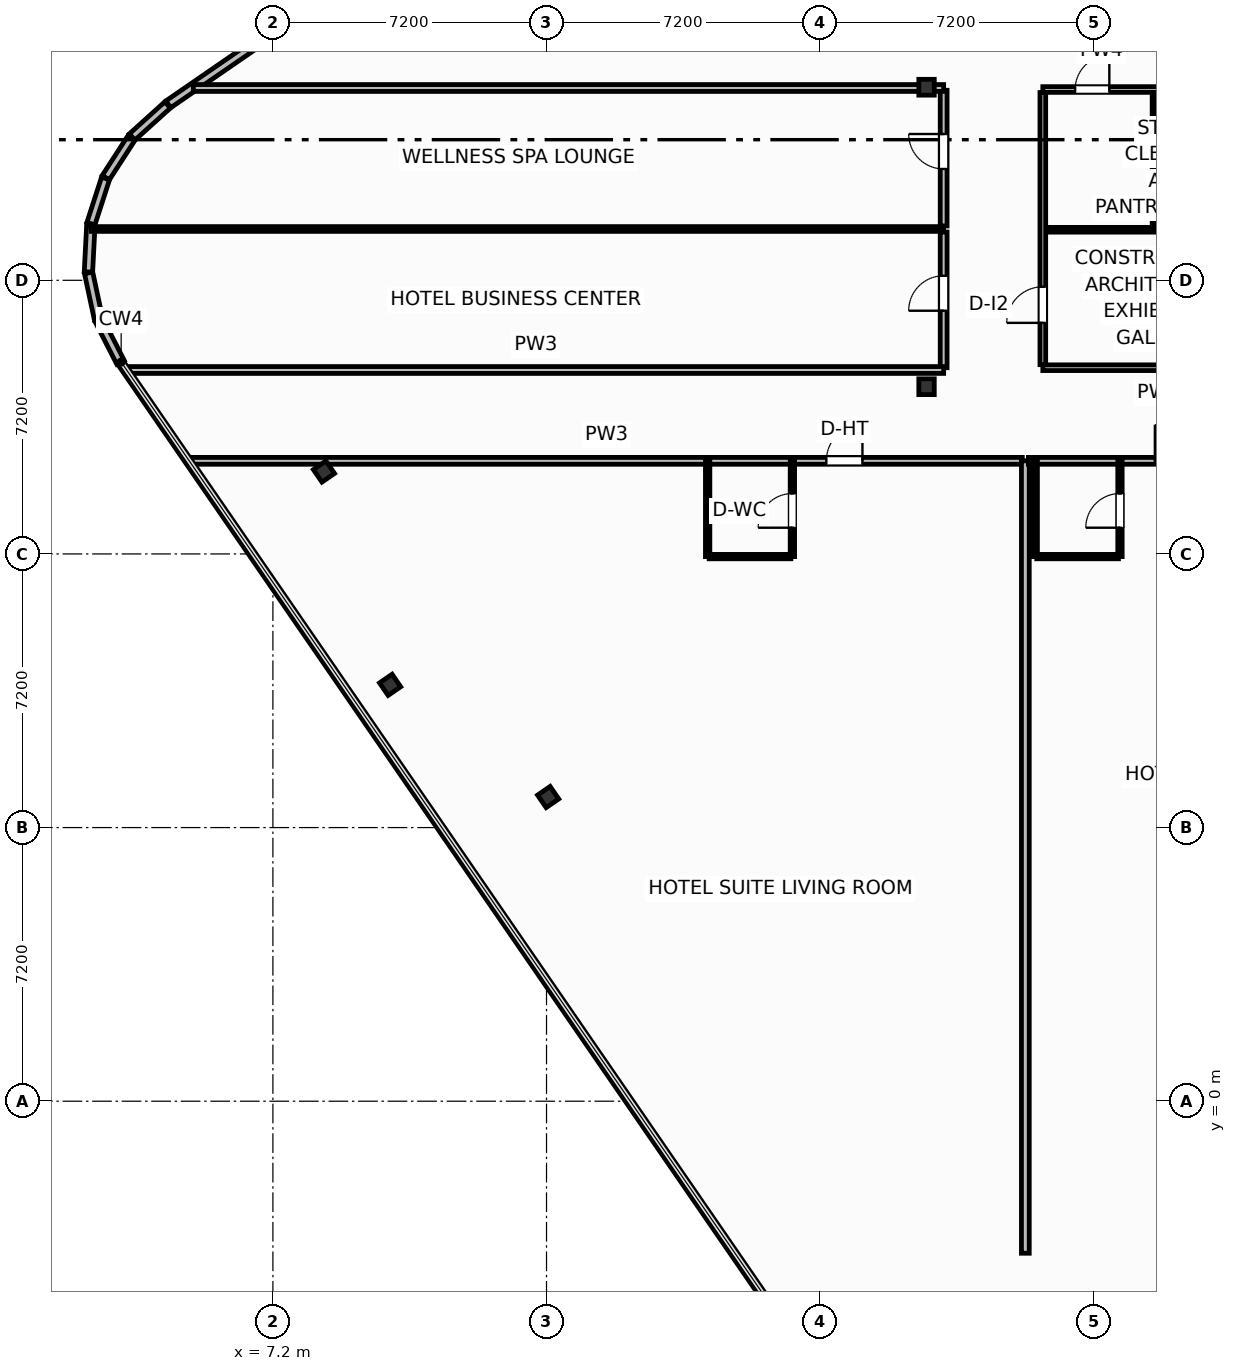
"""IFC4 building model, lengths in metres.
Left out: names, types, materials, properties, quantities, classifications, styles, units other than length and angle.
Written with IfcOpenShell. Run it as: python <this file> out.ifc"""

import sys

from ifc_helpers import new_model, si_unit, direction, frame, frame_2d, origin, origin_2d, place, context, subcontext, project, spatial, rectangle, i_section, extrude, element, fill, save


model = new_model("IFC4")
c1 = context("Model", 3, precision=1e-05, world=origin(), true_north=direction((0.0, 1.0)))
c2 = subcontext(c1, "Body", "Model", "MODEL_VIEW")
j1 = project(units=[si_unit("LENGTHUNIT", "METRE"), si_unit("PLANEANGLEUNIT", "RADIAN")], contexts=[c1])
p1 = place(None, origin())
s1 = spatial("IfcSite", under=j1, at=p1, CompositionType="ELEMENT")
p2 = place(p1, origin())
s2 = spatial("IfcBuilding", under=s1, at=p2, CompositionType="ELEMENT")
p3 = place(p2, frame((0.0, 0.0, 273.0)))
s3 = spatial("IfcBuildingStorey", under=s2, at=p3, CompositionType="ELEMENT", Elevation=273.0)
for number, where, z_axis, x_axis in (
    (1, (24.4, 18.8, 0.0), (0.0, 0.0, 1.0), (1.0, 0.0, 0.0)),
    (2, (24.4, 26.68, 0.0), (0.0, 0.0, 1.0), (1.0, 0.0, 0.0)),
):
    element("IfcColumn", number, at=place(p3, frame(where, z_axis=z_axis, x_axis=x_axis)), inside=s3, PredefinedType="COLUMN", context=c2, shape_type="SweptSolid", body=[
        extrude(i_section(OverallWidth=0.406, OverallDepth=0.416, WebThickness=0.03, FlangeThickness=0.048, FilletRadius=0.025, at=origin_2d()), origin(), (0.0, 0.0, 1.0), 3.7),
    ])
for number, where, z_axis, x_axis in (
    (3, (8.543, 16.569, 0.0), (0.0, 0.0, 1.0), (0.824, 0.567, 0.0)),
    (4, (10.284, 10.956, 0.0), (0.0, 0.0, 1.0), (0.824, 0.567, 0.0)),
    (5, (14.443, 8.004, 0.0), (0.0, 0.0, 1.0), (0.824, 0.567, 0.0)),
):
    element("IfcColumn", number, at=place(p3, frame(where, z_axis=z_axis, x_axis=x_axis)), inside=s3, PredefinedType="COLUMN", context=c2, shape_type="SweptSolid", body=[
        extrude(i_section(OverallWidth=0.401, OverallDepth=0.399, WebThickness=0.025, FlangeThickness=0.04, FilletRadius=0.022, at=origin_2d()), origin(), (0.0, 0.0, 1.0), 3.7),
    ])
p4 = place(p3, frame((27.704, -7.488, 0.0), z_axis=(0.0, 0.0, 1.0), x_axis=(0.823529068157, 0.567274073003, 0.0)))
e6 = element("IfcWall", 6, at=p4, inside=s3, PredefinedType="SOLIDWALL", context=c2, shape_type="SweptSolid", body=[
    extrude(rectangle(XDim=10.98, YDim=0.22, at=frame_2d((5.49, 0.0))), origin(), (0.0, 0.0, 1.0), 2.73),
])
p5 = place(p4, frame((4.44, 0.0, 0.8)))
e7 = element("IfcOpeningElement", 7, at=p5, cuts=e6, PredefinedType="OPENING", context=c2, shape_type="SweptSolid", body=[
    extrude(rectangle(XDim=2.1, YDim=1.75, at=frame_2d((1.05, 0.875))), frame((0.0, 0.12, 0.0), z_axis=(0.0, -1.0, 0.0), x_axis=(1.0, 0.0, 0.0)), (0.0, 0.0, 1.0), 0.24),
])
p6 = place(p3, frame((13.408, 32.402, 0.0), z_axis=(0.0, 0.0, 1.0), x_axis=(-0.823527634633, -0.567276154087, 0.0)))
e8 = element("IfcWall", 8, at=p6, inside=s3, PredefinedType="SOLIDWALL", context=c2, shape_type="SweptSolid", body=[
    extrude(rectangle(XDim=10.88, YDim=0.22, at=frame_2d((5.44, 0.0))), origin(), (0.0, 0.0, 1.0), 2.73),
])
p7 = place(p6, frame((4.39, 0.0, 0.8)))
e9 = element("IfcOpeningElement", 9, at=p7, cuts=e8, PredefinedType="OPENING", context=c2, shape_type="SweptSolid", body=[
    extrude(rectangle(XDim=2.1, YDim=1.75, at=frame_2d((1.05, 0.875))), frame((0.0, 0.12, 0.0), z_axis=(0.0, -1.0, 0.0), x_axis=(1.0, 0.0, 0.0)), (0.0, 0.0, 1.0), 0.24),
])
p8 = place(p3, frame((4.429, 26.213, 0.0), z_axis=(0.0, 0.0, 1.0), x_axis=(-0.742414330744, -0.669941013453, 0.0)))
e10 = element("IfcWall", 10, at=p8, inside=s3, PredefinedType="SOLIDWALL", context=c2, shape_type="SweptSolid", body=[
    extrude(rectangle(XDim=1.257, YDim=0.22, at=frame_2d((0.628, 0.0))), origin(), (0.0, 0.0, 1.0), 2.73),
])
for number, where, z_axis, x_axis in (
    (11, (3.482, 25.351, 0.0), (0.0, 0.0, 1.0), (-0.544, -0.839, 0.0)),
    (12, (2.796, 24.279, 0.0), (0.0, 0.0, 1.0), (-0.308, -0.951, 0.0)),
    (13, (2.41, 23.066, 0.0), (0.0, 0.0, 1.0), (-0.051, -0.999, 0.0)),
):
    element("IfcWall", number, at=place(p3, frame(where, z_axis=z_axis, x_axis=x_axis)), inside=s3, PredefinedType="SOLIDWALL", context=c2, shape_type="SweptSolid", body=[
        extrude(rectangle(XDim=1.249, YDim=0.22, at=frame_2d((0.624, 0.0))), origin(), (0.0, 0.0, 1.0), 2.73),
    ])
for number, where, z_axis, x_axis in (
    (14, (2.351, 21.795, 0.0), (0.0, 0.0, 1.0), (0.209, -0.978, 0.0)),
    (15, (2.623, 20.551, 0.0), (0.0, 0.0, 1.0), (0.455, -0.891, 0.0)),
):
    element("IfcWall", number, at=place(p3, frame(where, z_axis=z_axis, x_axis=x_axis)), inside=s3, PredefinedType="SOLIDWALL", context=c2, shape_type="SweptSolid", body=[
        extrude(rectangle(XDim=1.249, YDim=0.22, at=frame_2d((0.625, 0.0))), origin(), (0.0, 0.0, 1.0), 2.73),
    ])
p9 = place(p3, frame((5.038, 16.85, 0.0), z_axis=(0.0, 0.0, 1.0), x_axis=(1.0, 0.0, 0.0)))
e16 = element("IfcWall", 16, at=p9, inside=s3, PredefinedType="PARTITIONING", context=c2, shape_type="SweptSolid", body=[
    extrude(rectangle(XDim=21.882, YDim=0.18, at=frame_2d((10.941, 0.0))), origin(), (0.0, 0.0, 1.0), 2.739),
])
p10 = place(p9, frame((16.725, 0.0, 0.0)))
e17 = element("IfcOpeningElement", 17, at=p10, cuts=e16, PredefinedType="OPENING", context=c2, shape_type="SweptSolid", body=[
    extrude(rectangle(XDim=0.95, YDim=2.15, at=frame_2d((0.475, 1.075))), frame((0.0, 0.1, 0.0), z_axis=(0.0, -1.0, 0.0), x_axis=(1.0, 0.0, 0.0)), (0.0, 0.0, 1.0), 0.2),
])
p11 = place(p3, frame((18.68, 14.33, 0.0), z_axis=(0.0, 0.0, 1.0), x_axis=(1.0, 0.0, 0.0)))
e18 = element("IfcWall", 18, at=p11, inside=s3, PredefinedType="PARTITIONING", context=c2, shape_type="SweptSolid", body=[
    extrude(rectangle(XDim=2.15, YDim=0.115, at=frame_2d((1.075, 0.0))), origin(), (0.0, 0.0, 1.0), 3.45),
])
p12 = place(p3, frame((20.87, 14.33, 0.0), z_axis=(0.0, 0.0, 1.0), x_axis=(0.0, 1.0, 0.0)))
e19 = element("IfcWall", 19, at=p12, inside=s3, PredefinedType="PARTITIONING", context=c2, shape_type="SweptSolid", body=[
    extrude(rectangle(XDim=2.52, YDim=0.115, at=frame_2d((1.26, 0.0))), origin(), (0.0, 0.0, 1.0), 3.45),
])
p13 = place(p12, frame((0.76, 0.0, 0.0)))
e20 = element("IfcOpeningElement", 20, at=p13, cuts=e19, PredefinedType="OPENING", context=c2, shape_type="SweptSolid", body=[
    extrude(rectangle(XDim=0.9, YDim=2.05, at=frame_2d((0.45, 1.025))), frame((0.0, 0.067, 0.0), z_axis=(0.0, -1.0, 0.0), x_axis=(1.0, 0.0, 0.0)), (0.0, 0.0, 1.0), 0.135),
])
p14 = place(p3, frame((18.64, 14.33, 0.0), z_axis=(0.0, 0.0, 1.0), x_axis=(0.0, 1.0, 0.0)))
e21 = element("IfcWall", 21, at=p14, inside=s3, PredefinedType="PARTITIONING", context=c2, shape_type="SweptSolid", body=[
    extrude(rectangle(XDim=2.52, YDim=0.115, at=frame_2d((1.26, 0.0))), origin(), (0.0, 0.0, 1.0), 3.45),
])
p15 = place(p3, frame((27.0, -4.0, 0.0), z_axis=(0.0, 0.0, 1.0), x_axis=(0.0, 1.0, 0.0)))
e22 = element("IfcWall", 22, at=p15, inside=s3, PredefinedType="PARTITIONING", context=c2, shape_type="SweptSolid", body=[
    extrude(rectangle(XDim=20.85, YDim=0.205, at=frame_2d((10.425, 0.0))), origin(), (0.0, 0.0, 1.0), 3.45),
])
p16 = place(p3, frame((27.08, 16.85, 0.0), z_axis=(0.0, 0.0, 1.0), x_axis=(1.0, 0.0, 0.0)))
e23 = element("IfcWall", 23, at=p16, inside=s3, PredefinedType="PARTITIONING", context=c2, shape_type="SweptSolid", body=[
    extrude(rectangle(XDim=12.04, YDim=0.18, at=frame_2d((6.02, 0.0))), origin(), (0.0, 0.0, 1.0), 3.45),
])
p17 = place(p16, frame((3.328, 0.0, 0.0)))
e24 = element("IfcOpeningElement", 24, at=p17, cuts=e23, PredefinedType="OPENING", context=c2, shape_type="SweptSolid", body=[
    extrude(rectangle(XDim=0.95, YDim=2.15, at=frame_2d((0.475, 1.075))), frame((0.0, 0.1, 0.0), z_axis=(0.0, -1.0, 0.0), x_axis=(1.0, 0.0, 0.0)), (0.0, 0.0, 1.0), 0.2),
])
p18 = place(p3, frame((27.3, 14.33, 0.0), z_axis=(0.0, 0.0, 1.0), x_axis=(1.0, 0.0, 0.0)))
e25 = element("IfcWall", 25, at=p18, inside=s3, PredefinedType="PARTITIONING", context=c2, shape_type="SweptSolid", body=[
    extrude(rectangle(XDim=2.15, YDim=0.115, at=frame_2d((1.075, 0.0))), origin(), (0.0, 0.0, 1.0), 3.45),
])
p19 = place(p3, frame((29.49, 14.33, 0.0), z_axis=(0.0, 0.0, 1.0), x_axis=(0.0, 1.0, 0.0)))
e26 = element("IfcWall", 26, at=p19, inside=s3, PredefinedType="PARTITIONING", context=c2, shape_type="SweptSolid", body=[
    extrude(rectangle(XDim=2.52, YDim=0.115, at=frame_2d((1.26, 0.0))), origin(), (0.0, 0.0, 1.0), 3.45),
])
p20 = place(p19, frame((0.76, 0.0, 0.0)))
e27 = element("IfcOpeningElement", 27, at=p20, cuts=e26, PredefinedType="OPENING", context=c2, shape_type="SweptSolid", body=[
    extrude(rectangle(XDim=0.9, YDim=2.05, at=frame_2d((0.45, 1.025))), frame((0.0, 0.067, 0.0), z_axis=(0.0, -1.0, 0.0), x_axis=(1.0, 0.0, 0.0)), (0.0, 0.0, 1.0), 0.135),
])
p21 = place(p3, frame((27.26, 14.33, 0.0), z_axis=(0.0, 0.0, 1.0), x_axis=(0.0, 1.0, 0.0)))
e28 = element("IfcWall", 28, at=p21, inside=s3, PredefinedType="PARTITIONING", context=c2, shape_type="SweptSolid", body=[
    extrude(rectangle(XDim=2.52, YDim=0.115, at=frame_2d((1.26, 0.0))), origin(), (0.0, 0.0, 1.0), 3.45),
])
p22 = place(p3, frame((24.85, 19.3, 0.0), z_axis=(0.0, 0.0, 1.0), x_axis=(0.0, 1.0, 0.0)))
e29 = element("IfcWall", 29, at=p22, inside=s3, PredefinedType="PARTITIONING", context=c2, shape_type="SweptSolid", body=[
    extrude(rectangle(XDim=3.57, YDim=0.18, at=frame_2d((1.785, 0.0))), origin(), (0.0, 0.0, 1.0), 3.45),
])
p23 = place(p22, frame((1.5, 0.0, 0.0)))
e30 = element("IfcOpeningElement", 30, at=p23, cuts=e29, PredefinedType="OPENING", context=c2, shape_type="SweptSolid", body=[
    extrude(rectangle(XDim=0.92, YDim=2.05, at=frame_2d((0.46, 1.025))), frame((0.0, 0.1, 0.0), z_axis=(0.0, -1.0, 0.0), x_axis=(1.0, 0.0, 0.0)), (0.0, 0.0, 1.0), 0.2),
])
p24 = place(p3, frame((24.85, 23.03, 0.0), z_axis=(0.0, 0.0, 1.0), x_axis=(0.0, 1.0, 0.0)))
e31 = element("IfcWall", 31, at=p24, inside=s3, PredefinedType="PARTITIONING", context=c2, shape_type="SweptSolid", body=[
    extrude(rectangle(XDim=3.57, YDim=0.18, at=frame_2d((1.785, 0.0))), origin(), (0.0, 0.0, 1.0), 3.45),
])
p25 = place(p24, frame((1.5, 0.0, 0.0)))
e32 = element("IfcOpeningElement", 32, at=p25, cuts=e31, PredefinedType="OPENING", context=c2, shape_type="SweptSolid", body=[
    extrude(rectangle(XDim=0.92, YDim=2.05, at=frame_2d((0.46, 1.025))), frame((0.0, 0.1, 0.0), z_axis=(0.0, -1.0, 0.0), x_axis=(1.0, 0.0, 0.0)), (0.0, 0.0, 1.0), 0.2),
])
p26 = place(p3, frame((2.424, 22.95, 0.0), z_axis=(0.0, 0.0, 1.0), x_axis=(1.0, 0.0, 0.0)))
e33 = element("IfcWall", 33, at=p26, inside=s3, PredefinedType="PARTITIONING", context=c2, shape_type="SweptSolid", body=[
    extrude(rectangle(XDim=22.426, YDim=0.125, at=frame_2d((11.213, 0.0))), origin(), (0.0, 0.0, 1.0), 3.45),
])
p27 = place(p3, frame((3.392, 19.24, 0.0), z_axis=(0.0, 0.0, 1.0), x_axis=(1.0, 0.0, 0.0)))
e34 = element("IfcWall", 34, at=p27, inside=s3, PredefinedType="PARTITIONING", context=c2, shape_type="SweptSolid", body=[
    extrude(rectangle(XDim=21.458, YDim=0.18, at=frame_2d((10.729, 0.0))), origin(), (0.0, 0.0, 1.0), 3.45),
])
p28 = place(p3, frame((5.107, 26.66, 0.0), z_axis=(0.0, 0.0, 1.0), x_axis=(1.0, 0.0, 0.0)))
e35 = element("IfcWall", 35, at=p28, inside=s3, PredefinedType="PARTITIONING", context=c2, shape_type="SweptSolid", body=[
    extrude(rectangle(XDim=19.743, YDim=0.18, at=frame_2d((9.872, 0.0))), origin(), (0.0, 0.0, 1.0), 2.662),
])
p29 = place(p3, frame((27.46, 19.3, 0.0), z_axis=(0.0, 0.0, 1.0), x_axis=(1.0, 0.0, 0.0)))
e36 = element("IfcWall", 36, at=p29, inside=s3, PredefinedType="PARTITIONING", context=c2, shape_type="SweptSolid", body=[
    extrude(rectangle(XDim=6.1, YDim=0.15, at=frame_2d((3.05, 0.0))), origin(), (0.0, 0.0, 1.0), 2.662),
])
p30 = place(p3, frame((27.46, 26.62, 0.0), z_axis=(0.0, 0.0, 1.0), x_axis=(1.0, 0.0, 0.0)))
e37 = element("IfcWall", 37, at=p30, inside=s3, PredefinedType="PARTITIONING", context=c2, shape_type="SweptSolid", body=[
    extrude(rectangle(XDim=6.1, YDim=0.15, at=frame_2d((3.05, 0.0))), origin(), (0.0, 0.0, 1.0), 2.662),
])
p31 = place(p30, frame((0.85, 0.0, 0.0)))
e38 = element("IfcOpeningElement", 38, at=p31, cuts=e37, PredefinedType="OPENING", context=c2, shape_type="SweptSolid", body=[
    extrude(rectangle(XDim=0.9, YDim=2.05, at=frame_2d((0.45, 1.025))), frame((0.0, 0.085, 0.0), z_axis=(0.0, -1.0, 0.0), x_axis=(1.0, 0.0, 0.0)), (0.0, 0.0, 1.0), 0.17),
])
p32 = place(p30, frame((3.85, 0.0, 0.0)))
e39 = element("IfcOpeningElement", 39, at=p32, cuts=e37, PredefinedType="OPENING", context=c2, shape_type="SweptSolid", body=[
    extrude(rectangle(XDim=0.92, YDim=2.05, at=frame_2d((0.46, 1.025))), frame((0.0, 0.085, 0.0), z_axis=(0.0, -1.0, 0.0), x_axis=(1.0, 0.0, 0.0)), (0.0, 0.0, 1.0), 0.17),
])
p33 = place(p3, frame((27.52, 22.93, 0.0), z_axis=(0.0, 0.0, 1.0), x_axis=(1.0, 0.0, 0.0)))
e40 = element("IfcWall", 40, at=p33, inside=s3, PredefinedType="PARTITIONING", context=c2, shape_type="SweptSolid", body=[
    extrude(rectangle(XDim=6.0, YDim=0.125, at=frame_2d((3.0, 0.0))), origin(), (0.0, 0.0, 1.0), 3.45),
])
p34 = place(p3, frame((30.4, 23.0, 0.0), z_axis=(0.0, 0.0, 1.0), x_axis=(0.0, 1.0, 0.0)))
e41 = element("IfcWall", 41, at=p34, inside=s3, PredefinedType="PARTITIONING", context=c2, shape_type="SweptSolid", body=[
    extrude(rectangle(XDim=3.54, YDim=0.125, at=frame_2d((1.77, 0.0))), origin(), (0.0, 0.0, 1.0), 3.45),
])
p35 = place(p3, frame((27.46, 19.38, 0.0), z_axis=(0.0, 0.0, 1.0), x_axis=(0.0, 1.0, 0.0)))
e42 = element("IfcWall", 42, at=p35, inside=s3, PredefinedType="PARTITIONING", context=c2, shape_type="SweptSolid", body=[
    extrude(rectangle(XDim=7.16, YDim=0.15, at=frame_2d((3.58, 0.0))), origin(), (0.0, 0.0, 1.0), 3.45),
])
p36 = place(p35, frame((1.1, 0.0, 0.0)))
e43 = element("IfcOpeningElement", 43, at=p36, cuts=e42, PredefinedType="OPENING", context=c2, shape_type="SweptSolid", body=[
    extrude(rectangle(XDim=0.95, YDim=2.05, at=frame_2d((0.475, 1.025))), frame((0.0, 0.085, 0.0), z_axis=(0.0, -1.0, 0.0), x_axis=(1.0, 0.0, 0.0)), (0.0, 0.0, 1.0), 0.17),
])
p37 = place(p10, origin())
e44 = element("IfcDoor", 44, at=p37, inside=s3, OperationType="SINGLE_SWING_RIGHT", PredefinedType="DOOR", context=c2, shape_type="SweptSolid", body=[
    extrude(rectangle(XDim=0.95, YDim=2.15, at=frame_2d((0.475, 1.075))), frame((0.0, 0.025, 0.0), z_axis=(0.0, -1.0, 0.0), x_axis=(1.0, 0.0, 0.0)), (0.0, 0.0, 1.0), 0.05),
])
fill(e17, e44)
p38 = place(p13, origin())
e45 = element("IfcDoor", 45, at=p38, inside=s3, OperationType="SINGLE_SWING_LEFT", PredefinedType="DOOR", context=c2, shape_type="SweptSolid", body=[
    extrude(rectangle(XDim=0.9, YDim=2.05, at=frame_2d((0.45, 1.025))), frame((0.0, 0.025, 0.0), z_axis=(0.0, -1.0, 0.0), x_axis=(1.0, 0.0, 0.0)), (0.0, 0.0, 1.0), 0.05),
])
fill(e20, e45)
p39 = place(p17, origin())
e46 = element("IfcDoor", 46, at=p39, inside=s3, OperationType="SINGLE_SWING_LEFT", PredefinedType="DOOR", context=c2, shape_type="SweptSolid", body=[
    extrude(rectangle(XDim=0.95, YDim=2.15, at=frame_2d((0.475, 1.075))), frame((0.0, 0.025, 0.0), z_axis=(0.0, -1.0, 0.0), x_axis=(1.0, 0.0, 0.0)), (0.0, 0.0, 1.0), 0.05),
])
fill(e24, e46)
p40 = place(p20, origin())
e47 = element("IfcDoor", 47, at=p40, inside=s3, OperationType="SINGLE_SWING_LEFT", PredefinedType="DOOR", context=c2, shape_type="SweptSolid", body=[
    extrude(rectangle(XDim=0.9, YDim=2.05, at=frame_2d((0.45, 1.025))), frame((0.0, 0.025, 0.0), z_axis=(0.0, -1.0, 0.0), x_axis=(1.0, 0.0, 0.0)), (0.0, 0.0, 1.0), 0.05),
])
fill(e27, e47)
p41 = place(p23, origin())
e48 = element("IfcDoor", 48, at=p41, inside=s3, OperationType="SINGLE_SWING_LEFT", PredefinedType="DOOR", context=c2, shape_type="SweptSolid", body=[
    extrude(rectangle(XDim=0.92, YDim=2.05, at=frame_2d((0.46, 1.025))), frame((0.0, 0.025, 0.0), z_axis=(0.0, -1.0, 0.0), x_axis=(1.0, 0.0, 0.0)), (0.0, 0.0, 1.0), 0.05),
])
fill(e30, e48)
p42 = place(p25, origin())
e49 = element("IfcDoor", 49, at=p42, inside=s3, OperationType="SINGLE_SWING_RIGHT", PredefinedType="DOOR", context=c2, shape_type="SweptSolid", body=[
    extrude(rectangle(XDim=0.92, YDim=2.05, at=frame_2d((0.46, 1.025))), frame((0.0, 0.025, 0.0), z_axis=(0.0, -1.0, 0.0), x_axis=(1.0, 0.0, 0.0)), (0.0, 0.0, 1.0), 0.05),
])
fill(e32, e49)
p43 = place(p31, origin())
e50 = element("IfcDoor", 50, at=p43, inside=s3, OperationType="SINGLE_SWING_RIGHT", PredefinedType="DOOR", context=c2, shape_type="SweptSolid", body=[
    extrude(rectangle(XDim=0.9, YDim=2.05, at=frame_2d((0.45, 1.025))), frame((0.0, 0.025, 0.0), z_axis=(0.0, -1.0, 0.0), x_axis=(1.0, 0.0, 0.0)), (0.0, 0.0, 1.0), 0.05),
])
fill(e38, e50)
p44 = place(p36, origin())
e51 = element("IfcDoor", 51, at=p44, inside=s3, OperationType="SINGLE_SWING_LEFT", PredefinedType="DOOR", context=c2, shape_type="SweptSolid", body=[
    extrude(rectangle(XDim=0.95, YDim=2.05, at=frame_2d((0.475, 1.025))), frame((0.0, 0.025, 0.0), z_axis=(0.0, -1.0, 0.0), x_axis=(1.0, 0.0, 0.0)), (0.0, 0.0, 1.0), 0.05),
])
fill(e43, e51)
save(model, sys.argv[1])
